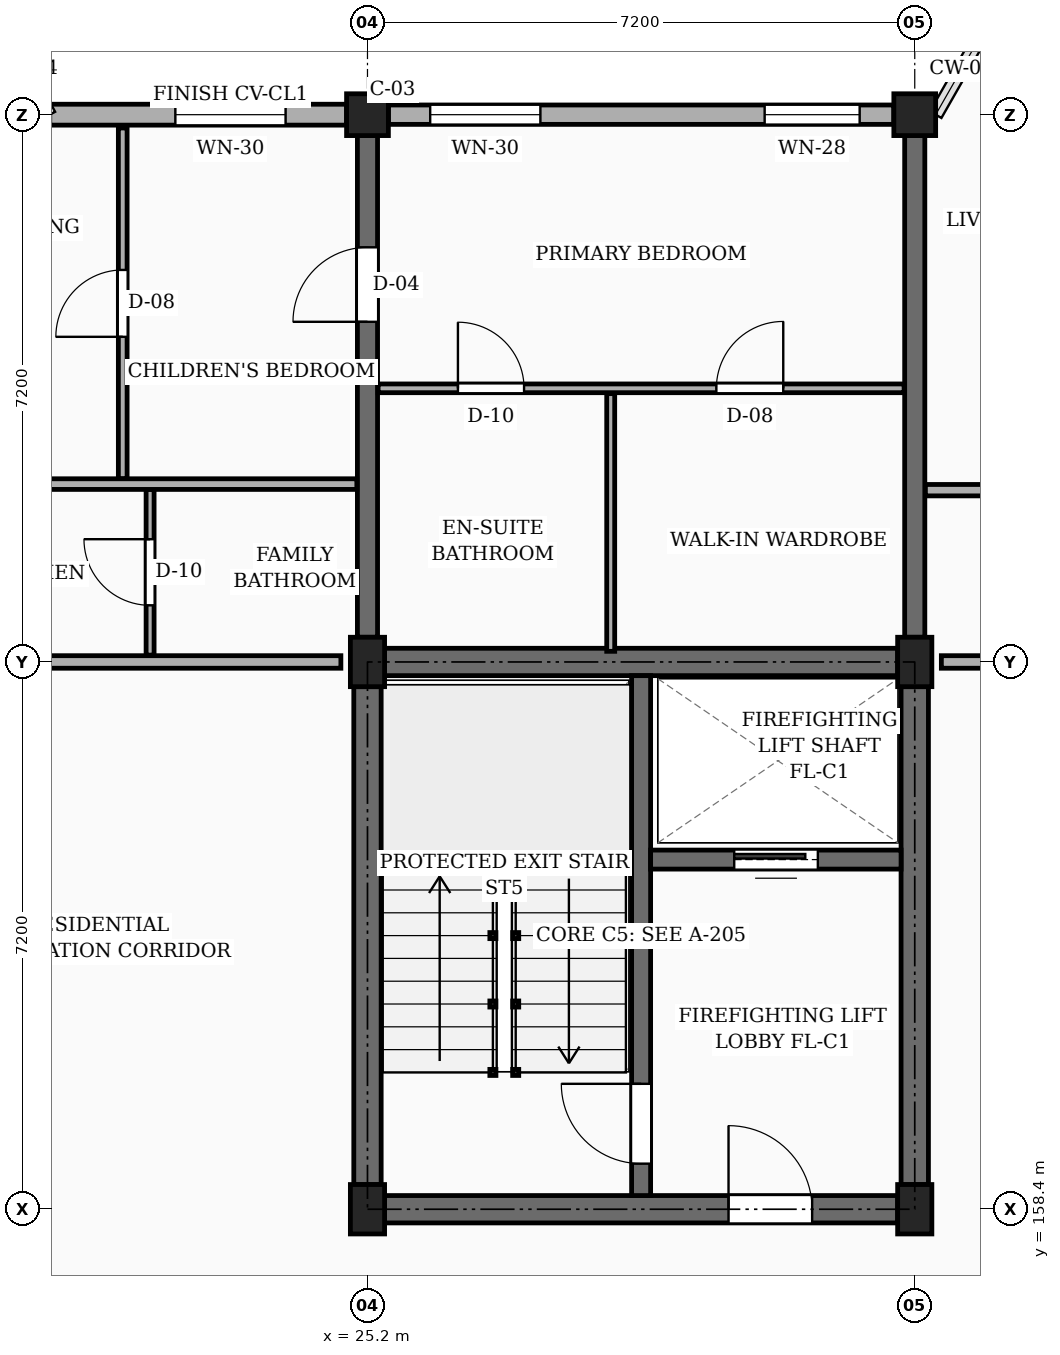
"""IFC4 building model, lengths in metres.
Left out: names, types, materials, properties, quantities, classifications, styles, units other than length and angle.
Written with IfcOpenShell. Run it as: python <this file> out.ifc"""

import sys

from ifc_helpers import new_model, si_unit, direction, frame, frame_2d, origin, origin_2d, place, context, subcontext, project, spatial, rectangle, extrude, element, fill, save


model = new_model("IFC4")
c1 = context("Model", 3, precision=1e-05, world=origin(), true_north=direction((0.0, 1.0)))
c2 = subcontext(c1, "Body", "Model", "MODEL_VIEW")
j1 = project(units=[si_unit("LENGTHUNIT", "METRE"), si_unit("PLANEANGLEUNIT", "RADIAN")], contexts=[c1])
p1 = place(None, origin())
s1 = spatial("IfcSite", under=j1, at=p1, CompositionType="ELEMENT")
p2 = place(p1, origin())
s2 = spatial("IfcBuilding", under=s1, at=p2, CompositionType="ELEMENT")
p3 = place(p2, frame((0.0, 0.0, 10.8)))
s3 = spatial("IfcBuildingStorey", under=s2, at=p3, CompositionType="ELEMENT", Elevation=10.8)
for number, where, z_axis, x_axis in (
    (1, (25.2, 158.4, 0.0), (0.0, 0.0, 1.0), (1.0, 0.0, 0.0)),
    (2, (25.2, 165.6, 0.0), (0.0, 0.0, 1.0), (1.0, 0.0, 0.0)),
):
    element("IfcColumn", number, at=place(p3, frame(where, z_axis=z_axis, x_axis=x_axis)), inside=s3, PredefinedType="COLUMN", context=c2, shape_type="SweptSolid", body=[
        extrude(rectangle(XDim=0.45, YDim=0.65, at=origin_2d()), origin(), (0.0, 0.0, 1.0), 3.15),
    ])
p4 = place(p3, frame((25.2, 172.8, 0.0), z_axis=(0.0, 0.0, 1.0), x_axis=(1.0, 0.0, 0.0)))
e3 = element("IfcColumn", 3, at=p4, inside=s3, PredefinedType="COLUMN", context=c2, shape_type="SweptSolid", body=[
    extrude(rectangle(XDim=0.55, YDim=0.55, at=origin_2d()), origin(), (0.0, 0.0, 1.0), 3.15),
])
for number, where, z_axis, x_axis in (
    (4, (32.4, 158.4, 0.0), (0.0, 0.0, 1.0), (1.0, 0.0, 0.0)),
    (5, (32.4, 165.6, 0.0), (0.0, 0.0, 1.0), (1.0, 0.0, 0.0)),
):
    element("IfcColumn", number, at=place(p3, frame(where, z_axis=z_axis, x_axis=x_axis)), inside=s3, PredefinedType="COLUMN", context=c2, shape_type="SweptSolid", body=[
        extrude(rectangle(XDim=0.45, YDim=0.65, at=origin_2d()), origin(), (0.0, 0.0, 1.0), 3.15),
    ])
p5 = place(p3, frame((32.4, 172.8, 0.0), z_axis=(0.0, 0.0, 1.0), x_axis=(1.0, 0.0, 0.0)))
e6 = element("IfcColumn", 6, at=p5, inside=s3, PredefinedType="COLUMN", context=c2, shape_type="SweptSolid", body=[
    extrude(rectangle(XDim=0.55, YDim=0.55, at=origin_2d()), origin(), (0.0, 0.0, 1.0), 3.15),
])
p6 = place(p3, frame((25.2, 165.925, 0.0), z_axis=(0.0, 0.0, 1.0), x_axis=(0.0, 1.0, 0.0)))
e7 = element("IfcWall", 7, at=p6, inside=s3, PredefinedType="SOLIDWALL", context=c2, shape_type="SweptSolid", body=[
    extrude(rectangle(XDim=6.6, YDim=0.265, at=frame_2d((3.3, 0.0))), origin(), (0.0, 0.0, 1.0), 2.185),
])
p7 = place(p6, frame((4.15, 0.0, 0.0)))
e8 = element("IfcOpeningElement", 8, at=p7, cuts=e7, PredefinedType="OPENING", context=c2, shape_type="SweptSolid", body=[
    extrude(rectangle(XDim=0.98, YDim=2.12, at=frame_2d((0.49, 1.06))), frame((0.0, 0.143, 0.0), z_axis=(0.0, -1.0, 0.0), x_axis=(1.0, 0.0, 0.0)), (0.0, 0.0, 1.0), 0.285),
])
p8 = place(p3, frame((32.4, 165.925, 0.0), z_axis=(0.0, 0.0, 1.0), x_axis=(0.0, 1.0, 0.0)))
e9 = element("IfcWall", 9, at=p8, inside=s3, PredefinedType="SOLIDWALL", context=c2, shape_type="SweptSolid", body=[
    extrude(rectangle(XDim=6.6, YDim=0.265, at=frame_2d((3.3, 0.0))), origin(), (0.0, 0.0, 1.0), 2.185),
])
p9 = place(p3, frame((32.125, 172.8, 0.0), z_axis=(0.0, 0.0, 1.0), x_axis=(-1.0, 0.0, 0.0)))
e10 = element("IfcWall", 10, at=p9, inside=s3, PredefinedType="SOLIDWALL", context=c2, shape_type="SweptSolid", body=[
    extrude(rectangle(XDim=6.65, YDim=0.255, at=frame_2d((3.325, 0.0))), origin(), (0.0, 0.0, 1.0), 2.455),
])
p10 = place(p9, frame((0.45, 0.0, 0.78)))
e11 = element("IfcOpeningElement", 11, at=p10, cuts=e10, PredefinedType="OPENING", context=c2, shape_type="SweptSolid", body=[
    extrude(rectangle(XDim=1.25, YDim=1.44, at=frame_2d((0.625, 0.72))), frame((0.0, 0.137, 0.0), z_axis=(0.0, -1.0, 0.0), x_axis=(1.0, 0.0, 0.0)), (0.0, 0.0, 1.0), 0.275),
])
p11 = place(p9, frame((4.65, 0.0, 0.78)))
e12 = element("IfcOpeningElement", 12, at=p11, cuts=e10, PredefinedType="OPENING", context=c2, shape_type="SweptSolid", body=[
    extrude(rectangle(XDim=1.45, YDim=1.44, at=frame_2d((0.725, 0.72))), frame((0.0, 0.137, 0.0), z_axis=(0.0, -1.0, 0.0), x_axis=(1.0, 0.0, 0.0)), (0.0, 0.0, 1.0), 0.275),
])
p12 = place(p3, frame((24.925, 172.8, 0.0), z_axis=(0.0, 0.0, 1.0), x_axis=(-1.0, 0.0, 0.0)))
e13 = element("IfcWall", 13, at=p12, inside=s3, PredefinedType="SOLIDWALL", context=c2, shape_type="SweptSolid", body=[
    extrude(rectangle(XDim=3.905, YDim=0.275, at=frame_2d((1.953, 0.0))), origin(), (0.0, 0.0, 1.0), 2.455),
])
p13 = place(p12, frame((0.802, 0.0, 0.78)))
e14 = element("IfcOpeningElement", 14, at=p13, cuts=e13, PredefinedType="OPENING", context=c2, shape_type="SweptSolid", body=[
    extrude(rectangle(XDim=1.45, YDim=1.44, at=frame_2d((0.725, 0.72))), frame((0.0, 0.147, 0.0), z_axis=(0.0, -1.0, 0.0), x_axis=(1.0, 0.0, 0.0)), (0.0, 0.0, 1.0), 0.295),
])
p14 = place(p3, frame((25.2, 158.725, 0.0), z_axis=(0.0, 0.0, 1.0), x_axis=(0.0, 1.0, 0.0)))
e15 = element("IfcWall", 15, at=p14, inside=s3, PredefinedType="SHEAR", context=c2, shape_type="SweptSolid", body=[
    extrude(rectangle(XDim=6.55, YDim=0.36, at=frame_2d((3.275, 0.0))), origin(), (0.0, 0.0, 1.0), 2.885),
])
p15 = place(p3, frame((25.425, 165.6, 0.0), z_axis=(0.0, 0.0, 1.0), x_axis=(1.0, 0.0, 0.0)))
e16 = element("IfcWall", 16, at=p15, inside=s3, PredefinedType="SHEAR", context=c2, shape_type="SweptSolid", body=[
    extrude(rectangle(XDim=6.75, YDim=0.36, at=frame_2d((3.375, 0.0))), origin(), (0.0, 0.0, 1.0), 2.885),
])
p16 = place(p3, frame((32.4, 158.725, 0.0), z_axis=(0.0, 0.0, 1.0), x_axis=(0.0, 1.0, 0.0)))
e17 = element("IfcWall", 17, at=p16, inside=s3, PredefinedType="SHEAR", context=c2, shape_type="SweptSolid", body=[
    extrude(rectangle(XDim=6.55, YDim=0.36, at=frame_2d((3.275, 0.0))), origin(), (0.0, 0.0, 1.0), 2.885),
])
p17 = place(p3, frame((25.425, 158.4, 0.0), z_axis=(0.0, 0.0, 1.0), x_axis=(1.0, 0.0, 0.0)))
e18 = element("IfcWall", 18, at=p17, inside=s3, PredefinedType="SHEAR", context=c2, shape_type="SweptSolid", body=[
    extrude(rectangle(XDim=6.75, YDim=0.36, at=frame_2d((3.375, 0.0))), origin(), (0.0, 0.0, 1.0), 2.885),
])
p18 = place(p17, frame((4.525, 0.0, 0.0)))
e19 = element("IfcOpeningElement", 19, at=p18, cuts=e18, PredefinedType="OPENING", context=c2, shape_type="SweptSolid", body=[
    extrude(rectangle(XDim=1.1, YDim=2.15, at=frame_2d((0.55, 1.075))), frame((0.0, 0.19, 0.0), z_axis=(0.0, -1.0, 0.0), x_axis=(1.0, 0.0, 0.0)), (0.0, 0.0, 1.0), 0.38),
])
p19 = place(p3, frame((28.8, 158.58, 0.0), z_axis=(0.0, 0.0, 1.0), x_axis=(0.0, 1.0, 0.0)))
e20 = element("IfcWall", 20, at=p19, inside=s3, PredefinedType="SHEAR", context=c2, shape_type="SweptSolid", body=[
    extrude(rectangle(XDim=6.84, YDim=0.25, at=frame_2d((3.42, 0.0))), origin(), (0.0, 0.0, 1.0), 2.885),
])
p20 = place(p19, frame((0.42, 0.0, 0.0)))
e21 = element("IfcOpeningElement", 21, at=p20, cuts=e20, PredefinedType="OPENING", context=c2, shape_type="SweptSolid", body=[
    extrude(rectangle(XDim=1.05, YDim=2.15, at=frame_2d((0.525, 1.075))), frame((0.0, 0.135, 0.0), z_axis=(0.0, -1.0, 0.0), x_axis=(1.0, 0.0, 0.0)), (0.0, 0.0, 1.0), 0.27),
])
p21 = place(p3, frame((28.925, 163.0, 0.0), z_axis=(0.0, 0.0, 1.0), x_axis=(1.0, 0.0, 0.0)))
e22 = element("IfcWall", 22, at=p21, inside=s3, PredefinedType="SHEAR", context=c2, shape_type="SweptSolid", body=[
    extrude(rectangle(XDim=3.295, YDim=0.25, at=frame_2d((1.647, 0.0))), origin(), (0.0, 0.0, 1.0), 2.885),
])
p22 = place(p21, frame((1.1, 0.0, 0.0)))
e23 = element("IfcOpeningElement", 23, at=p22, cuts=e22, PredefinedType="OPENING", context=c2, shape_type="SweptSolid", body=[
    extrude(rectangle(XDim=1.1, YDim=2.2, at=frame_2d((0.55, 1.1))), frame((0.0, 0.135, 0.0), z_axis=(0.0, -1.0, 0.0), x_axis=(1.0, 0.0, 0.0)), (0.0, 0.0, 1.0), 0.27),
])
p23 = place(p3, frame((18.35, 165.6, 0.0), z_axis=(0.0, 0.0, 1.0), x_axis=(1.0, 0.0, 0.0)))
e24 = element("IfcWall", 24, at=p23, inside=s3, PredefinedType="PARTITIONING", context=c2, shape_type="SweptSolid", body=[
    extrude(rectangle(XDim=6.5, YDim=0.165, at=frame_2d((3.25, 0.0))), origin(), (0.0, 0.0, 1.0), 2.235),
])
p24 = place(p23, frame((1.0, 0.0, 0.0)))
e25 = element("IfcOpeningElement", 25, at=p24, cuts=e24, PredefinedType="OPENING", context=c2, shape_type="SweptSolid", body=[
    extrude(rectangle(XDim=1.14, YDim=2.18, at=frame_2d((0.57, 1.09))), frame((0.0, 0.093, 0.0), z_axis=(0.0, -1.0, 0.0), x_axis=(1.0, 0.0, 0.0)), (0.0, 0.0, 1.0), 0.185),
])
p25 = place(p3, frame((32.75, 165.6, 0.0), z_axis=(0.0, 0.0, 1.0), x_axis=(1.0, 0.0, 0.0)))
e26 = element("IfcWall", 26, at=p25, inside=s3, PredefinedType="PARTITIONING", context=c2, shape_type="SweptSolid", body=[
    extrude(rectangle(XDim=6.5, YDim=0.165, at=frame_2d((3.25, 0.0))), origin(), (0.0, 0.0, 1.0), 2.235),
])
p26 = place(p25, frame((1.0, 0.0, 0.0)))
e27 = element("IfcOpeningElement", 27, at=p26, cuts=e26, PredefinedType="OPENING", context=c2, shape_type="SweptSolid", body=[
    extrude(rectangle(XDim=1.0, YDim=2.15, at=frame_2d((0.5, 1.075))), frame((0.0, 0.093, 0.0), z_axis=(0.0, -1.0, 0.0), x_axis=(1.0, 0.0, 0.0)), (0.0, 0.0, 1.0), 0.185),
])
p27 = place(p3, frame((21.98, 168.01, 0.0), z_axis=(0.0, 0.0, 1.0), x_axis=(0.0, 1.0, 0.0)))
e28 = element("IfcWall", 28, at=p27, inside=s3, PredefinedType="PARTITIONING", context=c2, shape_type="SweptSolid", body=[
    extrude(rectangle(XDim=4.615, YDim=0.115, at=frame_2d((2.308, 0.0))), origin(), (0.0, 0.0, 1.0), 2.32),
])
p28 = place(p27, frame((1.867, 0.0, 0.0)))
e29 = element("IfcOpeningElement", 29, at=p28, cuts=e28, PredefinedType="OPENING", context=c2, shape_type="SweptSolid", body=[
    extrude(rectangle(XDim=0.88, YDim=2.08, at=frame_2d((0.44, 1.04))), frame((0.0, 0.067, 0.0), z_axis=(0.0, -1.0, 0.0), x_axis=(1.0, 0.0, 0.0)), (0.0, 0.0, 1.0), 0.135),
])
p29 = place(p3, frame((22.34, 165.69, 0.0), z_axis=(0.0, 0.0, 1.0), x_axis=(0.0, 1.0, 0.0)))
e30 = element("IfcWall", 30, at=p29, inside=s3, PredefinedType="PARTITIONING", context=c2, shape_type="SweptSolid", body=[
    extrude(rectangle(XDim=2.18, YDim=0.105, at=frame_2d((1.09, 0.0))), origin(), (0.0, 0.0, 1.0), 2.32),
])
p30 = place(p29, frame((0.655, 0.0, 0.0)))
e31 = element("IfcOpeningElement", 31, at=p30, cuts=e30, PredefinedType="OPENING", context=c2, shape_type="SweptSolid", body=[
    extrude(rectangle(XDim=0.87, YDim=2.05, at=frame_2d((0.435, 1.025))), frame((0.0, 0.062, 0.0), z_axis=(0.0, -1.0, 0.0), x_axis=(1.0, 0.0, 0.0)), (0.0, 0.0, 1.0), 0.125),
])
p31 = place(p3, frame((18.14, 167.94, 0.0), z_axis=(0.0, 0.0, 1.0), x_axis=(1.0, 0.0, 0.0)))
e32 = element("IfcWall", 32, at=p31, inside=s3, PredefinedType="PARTITIONING", context=c2, shape_type="SweptSolid", body=[
    extrude(rectangle(XDim=6.92, YDim=0.14, at=frame_2d((3.46, 0.0))), origin(), (0.0, 0.0, 1.0), 2.32),
])
p32 = place(p31, frame((1.31, 0.0, 0.0)))
e33 = element("IfcOpeningElement", 33, at=p32, cuts=e32, PredefinedType="OPENING", context=c2, shape_type="SweptSolid", body=[
    extrude(rectangle(XDim=0.92, YDim=2.1, at=frame_2d((0.46, 1.05))), frame((0.0, 0.08, 0.0), z_axis=(0.0, -1.0, 0.0), x_axis=(1.0, 0.0, 0.0)), (0.0, 0.0, 1.0), 0.16),
])
p33 = place(p3, frame((25.34, 169.2, 0.0), z_axis=(0.0, 0.0, 1.0), x_axis=(1.0, 0.0, 0.0)))
e34 = element("IfcWall", 34, at=p33, inside=s3, PredefinedType="PARTITIONING", context=c2, shape_type="SweptSolid", body=[
    extrude(rectangle(XDim=6.92, YDim=0.115, at=frame_2d((3.46, 0.0))), origin(), (0.0, 0.0, 1.0), 2.32),
])
p34 = place(p33, frame((1.05, 0.0, 0.0)))
e35 = element("IfcOpeningElement", 35, at=p34, cuts=e34, PredefinedType="OPENING", context=c2, shape_type="SweptSolid", body=[
    extrude(rectangle(XDim=0.87, YDim=2.05, at=frame_2d((0.435, 1.025))), frame((0.0, 0.067, 0.0), z_axis=(0.0, -1.0, 0.0), x_axis=(1.0, 0.0, 0.0)), (0.0, 0.0, 1.0), 0.135),
])
p35 = place(p33, frame((4.45, 0.0, 0.0)))
e36 = element("IfcOpeningElement", 36, at=p35, cuts=e34, PredefinedType="OPENING", context=c2, shape_type="SweptSolid", body=[
    extrude(rectangle(XDim=0.88, YDim=2.08, at=frame_2d((0.44, 1.04))), frame((0.0, 0.067, 0.0), z_axis=(0.0, -1.0, 0.0), x_axis=(1.0, 0.0, 0.0)), (0.0, 0.0, 1.0), 0.135),
])
p36 = place(p3, frame((28.4, 165.74, 0.0), z_axis=(0.0, 0.0, 1.0), x_axis=(0.0, 1.0, 0.0)))
e37 = element("IfcWall", 37, at=p36, inside=s3, PredefinedType="PARTITIONING", context=c2, shape_type="SweptSolid", body=[
    extrude(rectangle(XDim=3.39, YDim=0.105, at=frame_2d((1.695, 0.0))), origin(), (0.0, 0.0, 1.0), 2.32),
])
p37 = place(p3, frame((32.54, 167.86, 0.0), z_axis=(0.0, 0.0, 1.0), x_axis=(1.0, 0.0, 0.0)))
e38 = element("IfcWall", 38, at=p37, inside=s3, PredefinedType="PARTITIONING", context=c2, shape_type="SweptSolid", body=[
    extrude(rectangle(XDim=6.92, YDim=0.15, at=frame_2d((3.46, 0.0))), origin(), (0.0, 0.0, 1.0), 2.32),
])
p38 = place(p37, frame((1.31, 0.0, 0.0)))
e39 = element("IfcOpeningElement", 39, at=p38, cuts=e38, PredefinedType="OPENING", context=c2, shape_type="SweptSolid", body=[
    extrude(rectangle(XDim=0.95, YDim=2.1, at=frame_2d((0.475, 1.05))), frame((0.0, 0.085, 0.0), z_axis=(0.0, -1.0, 0.0), x_axis=(1.0, 0.0, 0.0)), (0.0, 0.0, 1.0), 0.17),
])
p39 = place(p10, origin())
e40 = element("IfcWindow", 40, at=p39, inside=s3, PartitioningType="SINGLE_PANEL", PredefinedType="WINDOW", context=c2, shape_type="SweptSolid", body=[
    extrude(rectangle(XDim=1.25, YDim=1.44, at=frame_2d((0.625, 0.72))), frame((0.0, 0.03, 0.0), z_axis=(0.0, -1.0, 0.0), x_axis=(1.0, 0.0, 0.0)), (0.0, 0.0, 1.0), 0.06),
])
fill(e11, e40)
p40 = place(p11, origin())
e41 = element("IfcWindow", 41, at=p40, inside=s3, PartitioningType="SINGLE_PANEL", PredefinedType="WINDOW", context=c2, shape_type="SweptSolid", body=[
    extrude(rectangle(XDim=1.45, YDim=1.44, at=frame_2d((0.725, 0.72))), frame((0.0, 0.03, 0.0), z_axis=(0.0, -1.0, 0.0), x_axis=(1.0, 0.0, 0.0)), (0.0, 0.0, 1.0), 0.06),
])
fill(e12, e41)
p41 = place(p13, origin())
e42 = element("IfcWindow", 42, at=p41, inside=s3, PartitioningType="SINGLE_PANEL", PredefinedType="WINDOW", context=c2, shape_type="SweptSolid", body=[
    extrude(rectangle(XDim=1.45, YDim=1.44, at=frame_2d((0.725, 0.72))), frame((0.0, 0.03, 0.0), z_axis=(0.0, -1.0, 0.0), x_axis=(1.0, 0.0, 0.0)), (0.0, 0.0, 1.0), 0.06),
])
fill(e14, e42)
p42 = place(p18, frame((1.1, 0.0, 0.0), z_axis=(0.0, 0.0, 1.0), x_axis=(-1.0, 0.0, 0.0)))
e43 = element("IfcDoor", 43, at=p42, inside=s3, OperationType="SINGLE_SWING_LEFT", PredefinedType="DOOR", context=c2, shape_type="SweptSolid", body=[
    extrude(rectangle(XDim=1.1, YDim=2.15, at=frame_2d((0.55, 1.075))), frame((0.0, 0.025, 0.0), z_axis=(0.0, -1.0, 0.0), x_axis=(1.0, 0.0, 0.0)), (0.0, 0.0, 1.0), 0.05),
])
fill(e19, e43)
p43 = place(p20, origin())
e44 = element("IfcDoor", 44, at=p43, inside=s3, OperationType="SINGLE_SWING_RIGHT", PredefinedType="DOOR", context=c2, shape_type="SweptSolid", body=[
    extrude(rectangle(XDim=1.05, YDim=2.15, at=frame_2d((0.525, 1.075))), frame((0.0, 0.025, 0.0), z_axis=(0.0, -1.0, 0.0), x_axis=(1.0, 0.0, 0.0)), (0.0, 0.0, 1.0), 0.05),
])
fill(e21, e44)
p44 = place(p22, origin())
e45 = element("IfcDoor", 45, at=p44, inside=s3, OperationType="SLIDING_TO_LEFT", PredefinedType="DOOR", context=c2, shape_type="SweptSolid", body=[
    extrude(rectangle(XDim=1.1, YDim=2.2, at=frame_2d((0.55, 1.1))), frame((0.0, 0.025, 0.0), z_axis=(0.0, -1.0, 0.0), x_axis=(1.0, 0.0, 0.0)), (0.0, 0.0, 1.0), 0.05),
])
fill(e23, e45)
p45 = place(p28, origin())
e46 = element("IfcDoor", 46, at=p45, inside=s3, OperationType="SINGLE_SWING_LEFT", PredefinedType="DOOR", context=c2, shape_type="SweptSolid", body=[
    extrude(rectangle(XDim=0.88, YDim=2.08, at=frame_2d((0.44, 1.04))), frame((0.0, 0.025, 0.0), z_axis=(0.0, -1.0, 0.0), x_axis=(1.0, 0.0, 0.0)), (0.0, 0.0, 1.0), 0.05),
])
fill(e29, e46)
p46 = place(p30, origin())
e47 = element("IfcDoor", 47, at=p46, inside=s3, OperationType="SINGLE_SWING_RIGHT", PredefinedType="DOOR", context=c2, shape_type="SweptSolid", body=[
    extrude(rectangle(XDim=0.87, YDim=2.05, at=frame_2d((0.435, 1.025))), frame((0.0, 0.025, 0.0), z_axis=(0.0, -1.0, 0.0), x_axis=(1.0, 0.0, 0.0)), (0.0, 0.0, 1.0), 0.05),
])
fill(e31, e47)
p47 = place(p34, origin())
e48 = element("IfcDoor", 48, at=p47, inside=s3, OperationType="SINGLE_SWING_LEFT", PredefinedType="DOOR", context=c2, shape_type="SweptSolid", body=[
    extrude(rectangle(XDim=0.87, YDim=2.05, at=frame_2d((0.435, 1.025))), frame((0.0, 0.025, 0.0), z_axis=(0.0, -1.0, 0.0), x_axis=(1.0, 0.0, 0.0)), (0.0, 0.0, 1.0), 0.05),
])
fill(e35, e48)
p48 = place(p35, origin())
e49 = element("IfcDoor", 49, at=p48, inside=s3, OperationType="SINGLE_SWING_RIGHT", PredefinedType="DOOR", context=c2, shape_type="SweptSolid", body=[
    extrude(rectangle(XDim=0.88, YDim=2.08, at=frame_2d((0.44, 1.04))), frame((0.0, 0.025, 0.0), z_axis=(0.0, -1.0, 0.0), x_axis=(1.0, 0.0, 0.0)), (0.0, 0.0, 1.0), 0.05),
])
fill(e36, e49)
p49 = place(p7, origin())
e50 = element("IfcDoor", 50, at=p49, inside=s3, OperationType="SINGLE_SWING_LEFT", PredefinedType="DOOR", context=c2, shape_type="SweptSolid", body=[
    extrude(rectangle(XDim=0.98, YDim=2.12, at=frame_2d((0.49, 1.06))), frame((0.0, 0.025, 0.0), z_axis=(0.0, -1.0, 0.0), x_axis=(1.0, 0.0, 0.0)), (0.0, 0.0, 1.0), 0.05),
])
fill(e8, e50)
save(model, sys.argv[1])
